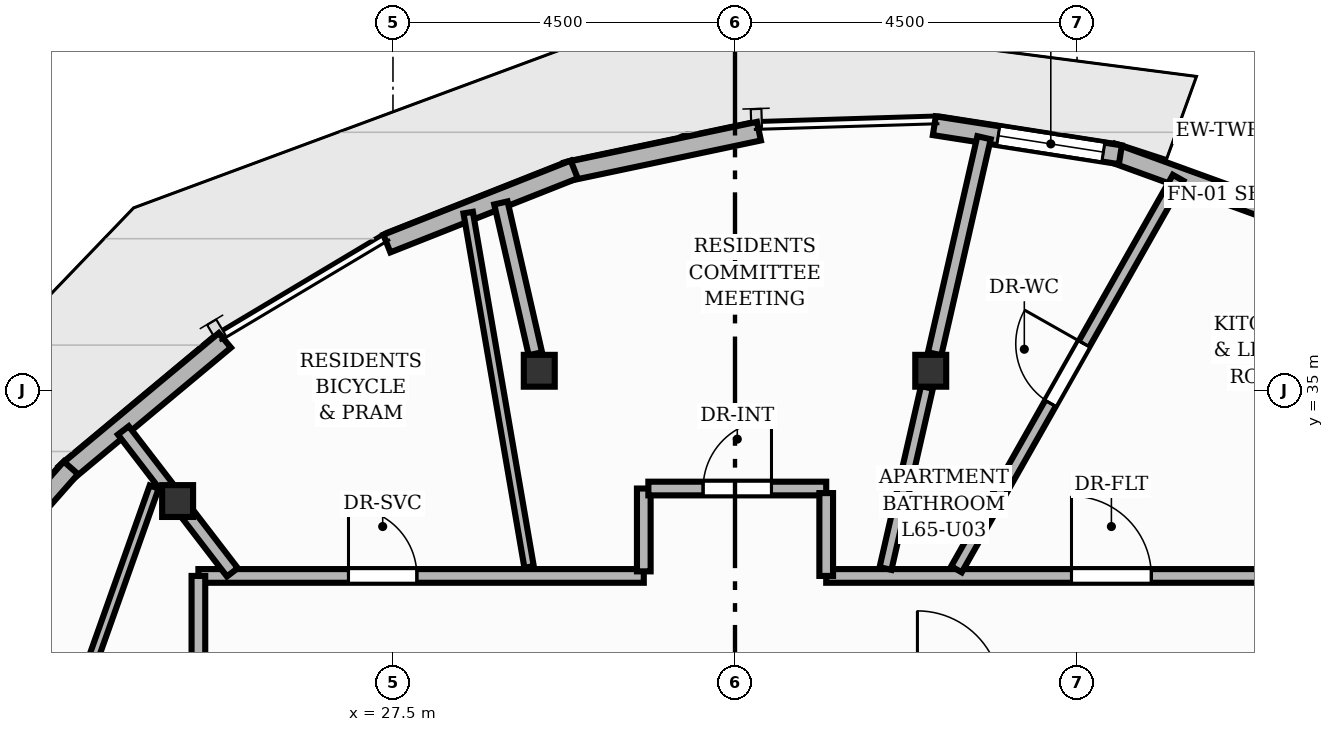
"""IFC4 building model, lengths in metres.
Left out: names, types, materials, properties, quantities, classifications, styles, units other than length and angle.
Written with IfcOpenShell. Run it as: python <this file> out.ifc"""

import sys

from ifc_helpers import new_model, si_unit, direction, frame, frame_2d, origin, origin_2d, place, context, subcontext, project, spatial, rectangle, i_section, extrude, element, fill, save


model = new_model("IFC4")
c1 = context("Model", 3, precision=1e-05, world=origin(), true_north=direction((0.0, 1.0)))
c2 = subcontext(c1, "Body", "Model", "MODEL_VIEW")
j1 = project(units=[si_unit("LENGTHUNIT", "METRE"), si_unit("PLANEANGLEUNIT", "RADIAN")], contexts=[c1])
p1 = place(None, origin())
s1 = spatial("IfcSite", under=j1, at=p1, CompositionType="ELEMENT")
p2 = place(p1, origin())
s2 = spatial("IfcBuilding", under=s1, at=p2, CompositionType="ELEMENT")
p3 = place(p2, frame((0.0, 0.0, 217.44)))
s3 = spatial("IfcBuildingStorey", under=s2, at=p3, CompositionType="ELEMENT", Elevation=217.44)
for number, where, z_axis, x_axis in (
    (1, (34.575, 35.26, 0.0), (0.0, 0.0, 1.0), (1.0, 0.0, 0.0)),
    (2, (29.425, 35.26, 0.0), (0.0, 0.0, 1.0), (1.0, 0.0, 0.0)),
    (3, (24.667, 33.545, 0.0), (0.0, 0.0, 1.0), (1.0, 0.0, 0.0)),
):
    element("IfcColumn", number, at=place(p3, frame(where, z_axis=z_axis, x_axis=x_axis)), inside=s3, PredefinedType="COLUMN", context=c2, shape_type="SweptSolid", body=[
        extrude(i_section(OverallWidth=0.407, OverallDepth=0.419, WebThickness=0.031, FlangeThickness=0.049, at=origin_2d()), origin(), (0.0, 0.0, 1.0), 3.2),
    ])
p4 = place(p3, frame((36.96, 38.13, 0.0), z_axis=(0.0, 0.0, 1.0), x_axis=(0.939954186413, -0.341300640851, 0.0)))
e4 = element("IfcWall", 4, at=p4, inside=s3, PredefinedType="SOLIDWALL", context=c2, shape_type="SweptSolid", body=[
    extrude(rectangle(XDim=2.437, YDim=0.25, at=frame_2d((1.219, 0.0))), origin(), (0.0, 0.0, 1.0), 2.96),
])
p5 = place(p3, frame((34.622, 38.484, 0.0), z_axis=(0.0, 0.0, 1.0), x_axis=(0.988040195026, -0.154196540209, 0.0)))
e5 = element("IfcWall", 5, at=p5, inside=s3, PredefinedType="SOLIDWALL", context=c2, shape_type="SweptSolid", body=[
    extrude(rectangle(XDim=2.478, YDim=0.25, at=frame_2d((1.239, 0.0))), origin(), (0.0, 0.0, 1.0), 2.96),
])
p6 = place(p5, frame((0.851, 0.0, 0.85)))
e6 = element("IfcOpeningElement", 6, at=p6, cuts=e5, PredefinedType="OPENING", context=c2, shape_type="SweptSolid", body=[
    extrude(rectangle(XDim=1.4, YDim=1.52, at=frame_2d((0.7, 0.76))), frame((0.0, 0.135, 0.0), z_axis=(0.0, -1.0, 0.0), x_axis=(1.0, 0.0, 0.0)), (0.0, 0.0, 1.0), 0.27),
])
p7 = place(p3, frame((29.779, 37.877, 0.0), z_axis=(0.0, 0.0, 1.0), x_axis=(0.978434707222, 0.206556345104, 0.0)))
e7 = element("IfcWall", 7, at=p7, inside=s3, PredefinedType="SOLIDWALL", context=c2, shape_type="SweptSolid", body=[
    extrude(rectangle(XDim=2.592, YDim=0.25, at=frame_2d((1.296, 0.0))), origin(), (0.0, 0.0, 1.0), 2.96),
])
p8 = place(p3, frame((27.42, 36.933, 0.0), z_axis=(0.0, 0.0, 1.0), x_axis=(0.929861098324, 0.36791077427, 0.0)))
e8 = element("IfcWall", 8, at=p8, inside=s3, PredefinedType="SOLIDWALL", context=c2, shape_type="SweptSolid", body=[
    extrude(rectangle(XDim=2.651, YDim=0.25, at=frame_2d((1.326, 0.0))), origin(), (0.0, 0.0, 1.0), 2.96),
])
p9 = place(p3, frame((23.184, 33.906, 0.0), z_axis=(0.0, 0.0, 1.0), x_axis=(0.76821397209, 0.640193168571, 0.0)))
e9 = element("IfcWall", 9, at=p9, inside=s3, PredefinedType="SOLIDWALL", context=c2, shape_type="SweptSolid", body=[
    extrude(rectangle(XDim=2.739, YDim=0.25, at=frame_2d((1.369, 0.0))), origin(), (0.0, 0.0, 1.0), 2.96),
])
p10 = place(p3, frame((21.437, 31.915, 0.0), z_axis=(0.0, 0.0, 1.0), x_axis=(0.661694827408, 0.749773269317, 0.0)))
e10 = element("IfcWall", 10, at=p10, inside=s3, PredefinedType="SOLIDWALL", context=c2, shape_type="SweptSolid", body=[
    extrude(rectangle(XDim=2.758, YDim=0.25, at=frame_2d((1.379, 0.0))), origin(), (0.0, 0.0, 1.0), 2.96),
])
p11 = place(p10, frame((0.554, 0.0, 0.85)))
e11 = element("IfcOpeningElement", 11, at=p11, cuts=e10, PredefinedType="OPENING", context=c2, shape_type="SweptSolid", body=[
    extrude(rectangle(XDim=1.65, YDim=1.55, at=frame_2d((0.825, 0.775))), frame((0.0, 0.135, 0.0), z_axis=(0.0, -1.0, 0.0), x_axis=(1.0, 0.0, 0.0)), (0.0, 0.0, 1.0), 0.27),
])
p12 = place(p3, frame((34.626, 35.483, 0.0), z_axis=(0.0, 0.0, 1.0), x_axis=(0.222945280676, 0.974830960641, 0.0)))
e12 = element("IfcWall", 12, at=p12, inside=s3, PredefinedType="PARTITIONING", context=c2, shape_type="SweptSolid", body=[
    extrude(rectangle(XDim=2.916, YDim=0.18, at=frame_2d((1.458, 0.0))), origin(), (0.0, 0.0, 1.0), 2.404),
])
p13 = place(p3, frame((29.374, 35.483, 0.0), z_axis=(0.0, 0.0, 1.0), x_axis=(-0.222932254148, 0.974833939736, 0.0)))
e13 = element("IfcWall", 13, at=p13, inside=s3, PredefinedType="PARTITIONING", context=c2, shape_type="SweptSolid", body=[
    extrude(rectangle(XDim=2.036, YDim=0.18, at=frame_2d((1.018, 0.0))), origin(), (0.0, 0.0, 1.0), 2.404),
])
p14 = place(p3, frame((24.527, 33.727, 0.0), z_axis=(0.0, 0.0, 1.0), x_axis=(-0.60903478373, 0.793143512995, 0.0)))
e14 = element("IfcWall", 14, at=p14, inside=s3, PredefinedType="PARTITIONING", context=c2, shape_type="SweptSolid", body=[
    extrude(rectangle(XDim=0.943, YDim=0.18, at=frame_2d((0.471, 0.0))), origin(), (0.0, 0.0, 1.0), 2.404),
])
p15 = place(p3, frame((33.2, 32.56, 0.0), z_axis=(0.0, 0.0, 1.0), x_axis=(1.0, 0.0, 0.0)))
e15 = element("IfcWall", 15, at=p15, inside=s3, PredefinedType="PARTITIONING", context=c2, shape_type="SweptSolid", body=[
    extrude(rectangle(XDim=5.86, YDim=0.18, at=frame_2d((2.93, 0.0))), origin(), (0.0, 0.0, 1.0), 2.955),
])
p16 = place(p15, frame((3.227, 0.0, 0.0)))
e16 = element("IfcOpeningElement", 16, at=p16, cuts=e15, PredefinedType="OPENING", context=c2, shape_type="SweptSolid", body=[
    extrude(rectangle(XDim=1.05, YDim=2.15, at=frame_2d((0.525, 1.075))), frame((0.0, 0.1, 0.0), z_axis=(0.0, -1.0, 0.0), x_axis=(1.0, 0.0, 0.0)), (0.0, 0.0, 1.0), 0.2),
])
p17 = place(p3, frame((24.94, 32.56, 0.0), z_axis=(0.0, 0.0, 1.0), x_axis=(1.0, 0.0, 0.0)))
e17 = element("IfcWall", 17, at=p17, inside=s3, PredefinedType="PARTITIONING", context=c2, shape_type="SweptSolid", body=[
    extrude(rectangle(XDim=5.86, YDim=0.18, at=frame_2d((2.93, 0.0))), origin(), (0.0, 0.0, 1.0), 2.955),
])
p18 = place(p17, frame((1.975, 0.0, 0.0)))
e18 = element("IfcOpeningElement", 18, at=p18, cuts=e17, PredefinedType="OPENING", context=c2, shape_type="SweptSolid", body=[
    extrude(rectangle(XDim=0.9, YDim=2.1, at=frame_2d((0.45, 1.05))), frame((0.0, 0.1, 0.0), z_axis=(0.0, -1.0, 0.0), x_axis=(1.0, 0.0, 0.0)), (0.0, 0.0, 1.0), 0.2),
])
p19 = place(p3, frame((30.8, 32.62, 0.0), z_axis=(0.0, 0.0, 1.0), x_axis=(0.0, 1.0, 0.0)))
e19 = element("IfcWall", 19, at=p19, inside=s3, PredefinedType="PARTITIONING", context=c2, shape_type="SweptSolid", body=[
    extrude(rectangle(XDim=1.09, YDim=0.18, at=frame_2d((0.545, 0.0))), origin(), (0.0, 0.0, 1.0), 2.955),
])
p20 = place(p3, frame((30.86, 33.71, 0.0), z_axis=(0.0, 0.0, 1.0), x_axis=(1.0, 0.0, 0.0)))
e20 = element("IfcWall", 20, at=p20, inside=s3, PredefinedType="PARTITIONING", context=c2, shape_type="SweptSolid", body=[
    extrude(rectangle(XDim=2.34, YDim=0.18, at=frame_2d((1.17, 0.0))), origin(), (0.0, 0.0, 1.0), 2.955),
])
p21 = place(p20, frame((0.72, 0.0, 0.0)))
e21 = element("IfcOpeningElement", 21, at=p21, cuts=e20, PredefinedType="OPENING", context=c2, shape_type="SweptSolid", body=[
    extrude(rectangle(XDim=0.9, YDim=2.1, at=frame_2d((0.45, 1.05))), frame((0.0, 0.1, 0.0), z_axis=(0.0, -1.0, 0.0), x_axis=(1.0, 0.0, 0.0)), (0.0, 0.0, 1.0), 0.2),
])
p22 = place(p3, frame((33.2, 33.65, 0.0), z_axis=(0.0, 0.0, 1.0), x_axis=(0.0, -1.0, 0.0)))
e22 = element("IfcWall", 22, at=p22, inside=s3, PredefinedType="PARTITIONING", context=c2, shape_type="SweptSolid", body=[
    extrude(rectangle(XDim=1.09, YDim=0.18, at=frame_2d((0.545, 0.0))), origin(), (0.0, 0.0, 1.0), 2.955),
])
p23 = place(p3, frame((24.94, 15.44, 0.0), z_axis=(0.0, 0.0, 1.0), x_axis=(0.0, 1.0, 0.0)))
e23 = element("IfcWall", 23, at=p23, inside=s3, PredefinedType="PARTITIONING", context=c2, shape_type="SweptSolid", body=[
    extrude(rectangle(XDim=17.12, YDim=0.18, at=frame_2d((8.56, 0.0))), origin(), (0.0, 0.0, 1.0), 2.955),
])
p24 = place(p23, frame((4.404, 0.0, 0.0)))
e24 = element("IfcOpeningElement", 24, at=p24, cuts=e23, PredefinedType="OPENING", context=c2, shape_type="SweptSolid", body=[
    extrude(rectangle(XDim=1.05, YDim=2.15, at=frame_2d((0.525, 1.075))), frame((0.0, 0.1, 0.0), z_axis=(0.0, -1.0, 0.0), x_axis=(1.0, 0.0, 0.0)), (0.0, 0.0, 1.0), 0.2),
])
p25 = place(p3, frame((34.914, 32.647, 0.0), z_axis=(0.0, 0.0, 1.0), x_axis=(0.492777372346, 0.870155423648, 0.0)))
e25 = element("IfcWall", 25, at=p25, inside=s3, PredefinedType="PLUMBINGWALL", context=c2, shape_type="SweptSolid", body=[
    extrude(rectangle(XDim=5.919, YDim=0.16, at=frame_2d((2.96, 0.0))), origin(), (0.0, 0.0, 1.0), 2.692),
])
p26 = place(p25, frame((2.51, 0.0, 0.0)))
e26 = element("IfcOpeningElement", 26, at=p26, cuts=e25, PredefinedType="OPENING", context=c2, shape_type="SweptSolid", body=[
    extrude(rectangle(XDim=0.9, YDim=2.1, at=frame_2d((0.45, 1.05))), frame((0.0, 0.09, 0.0), z_axis=(0.0, -1.0, 0.0), x_axis=(1.0, 0.0, 0.0)), (0.0, 0.0, 1.0), 0.18),
])
p27 = place(p3, frame((33.98, 32.657, 0.0), z_axis=(0.0, 0.0, 1.0), x_axis=(0.223006482474, 0.974816961678, 0.0)))
e27 = element("IfcWall", 27, at=p27, inside=s3, PredefinedType="PLUMBINGWALL", context=c2, shape_type="SweptSolid", body=[
    extrude(rectangle(XDim=2.445, YDim=0.16, at=frame_2d((1.222, 0.0))), origin(), (0.0, 0.0, 1.0), 2.404),
])
p28 = place(p3, frame((28.49, 37.341, 0.0), z_axis=(0.0, 0.0, 1.0), x_axis=(0.169376334169, -0.98555144839, 0.0)))
e28 = element("IfcWall", 28, at=p28, inside=s3, PredefinedType="PARTITIONING", context=c2, shape_type="SweptSolid", body=[
    extrude(rectangle(XDim=4.731, YDim=0.125, at=frame_2d((2.365, 0.0))), origin(), (0.0, 0.0, 1.0), 2.955),
])
p29 = place(p3, frame((25.387, 32.608, 0.0), z_axis=(0.0, 0.0, 1.0), x_axis=(-0.609302225724, 0.792938079378, 0.0)))
e29 = element("IfcWall", 29, at=p29, inside=s3, PredefinedType="PARTITIONING", context=c2, shape_type="SweptSolid", body=[
    extrude(rectangle(XDim=0.953, YDim=0.18, at=frame_2d((0.477, 0.0))), origin(), (0.0, 0.0, 1.0), 2.404),
])
p30 = place(p3, frame((20.501, 22.87, 0.0), z_axis=(0.0, 0.0, 1.0), x_axis=(0.334686593727, 0.942329498625, 0.0)))
e30 = element("IfcWall", 30, at=p30, inside=s3, PredefinedType="PARTITIONING", context=c2, shape_type="SweptSolid", body=[
    extrude(rectangle(XDim=11.525, YDim=0.125, at=frame_2d((5.762, 0.0))), origin(), (0.0, 0.0, 1.0), 2.488),
])
p31 = place(p30, frame((5.312, 0.0, 0.0)))
e31 = element("IfcOpeningElement", 31, at=p31, cuts=e30, PredefinedType="OPENING", context=c2, shape_type="SweptSolid", body=[
    extrude(rectangle(XDim=0.9, YDim=2.1, at=frame_2d((0.45, 1.05))), frame((0.0, 0.073, 0.0), z_axis=(0.0, -1.0, 0.0), x_axis=(1.0, 0.0, 0.0)), (0.0, 0.0, 1.0), 0.145),
])
p32 = place(p6, origin())
e32 = element("IfcWindow", 32, at=p32, inside=s3, PartitioningType="SINGLE_PANEL", PredefinedType="WINDOW", context=c2, shape_type="SweptSolid", body=[
    extrude(rectangle(XDim=1.4, YDim=1.52, at=frame_2d((0.7, 0.76))), frame((0.0, 0.03, 0.0), z_axis=(0.0, -1.0, 0.0), x_axis=(1.0, 0.0, 0.0)), (0.0, 0.0, 1.0), 0.06),
])
fill(e6, e32)
p33 = place(p16, origin())
e33 = element("IfcDoor", 33, at=p33, inside=s3, OperationType="SINGLE_SWING_LEFT", PredefinedType="DOOR", context=c2, shape_type="SweptSolid", body=[
    extrude(rectangle(XDim=1.05, YDim=2.15, at=frame_2d((0.525, 1.075))), frame((0.0, 0.025, 0.0), z_axis=(0.0, -1.0, 0.0), x_axis=(1.0, 0.0, 0.0)), (0.0, 0.0, 1.0), 0.05),
])
fill(e16, e33)
p34 = place(p26, origin())
e34 = element("IfcDoor", 34, at=p34, inside=s3, OperationType="SINGLE_SWING_RIGHT", PredefinedType="DOOR", context=c2, shape_type="SweptSolid", body=[
    extrude(rectangle(XDim=0.9, YDim=2.1, at=frame_2d((0.45, 1.05))), frame((0.0, 0.025, 0.0), z_axis=(0.0, -1.0, 0.0), x_axis=(1.0, 0.0, 0.0)), (0.0, 0.0, 1.0), 0.05),
])
fill(e26, e34)
p35 = place(p18, origin())
e35 = element("IfcDoor", 35, at=p35, inside=s3, OperationType="SINGLE_SWING_LEFT", PredefinedType="DOOR", context=c2, shape_type="SweptSolid", body=[
    extrude(rectangle(XDim=0.9, YDim=2.1, at=frame_2d((0.45, 1.05))), frame((0.0, 0.025, 0.0), z_axis=(0.0, -1.0, 0.0), x_axis=(1.0, 0.0, 0.0)), (0.0, 0.0, 1.0), 0.05),
])
fill(e18, e35)
p36 = place(p21, origin())
e36 = element("IfcDoor", 36, at=p36, inside=s3, OperationType="SINGLE_SWING_RIGHT", PredefinedType="DOOR", context=c2, shape_type="SweptSolid", body=[
    extrude(rectangle(XDim=0.9, YDim=2.1, at=frame_2d((0.45, 1.05))), frame((0.0, 0.025, 0.0), z_axis=(0.0, -1.0, 0.0), x_axis=(1.0, 0.0, 0.0)), (0.0, 0.0, 1.0), 0.05),
])
fill(e21, e36)
save(model, sys.argv[1])
